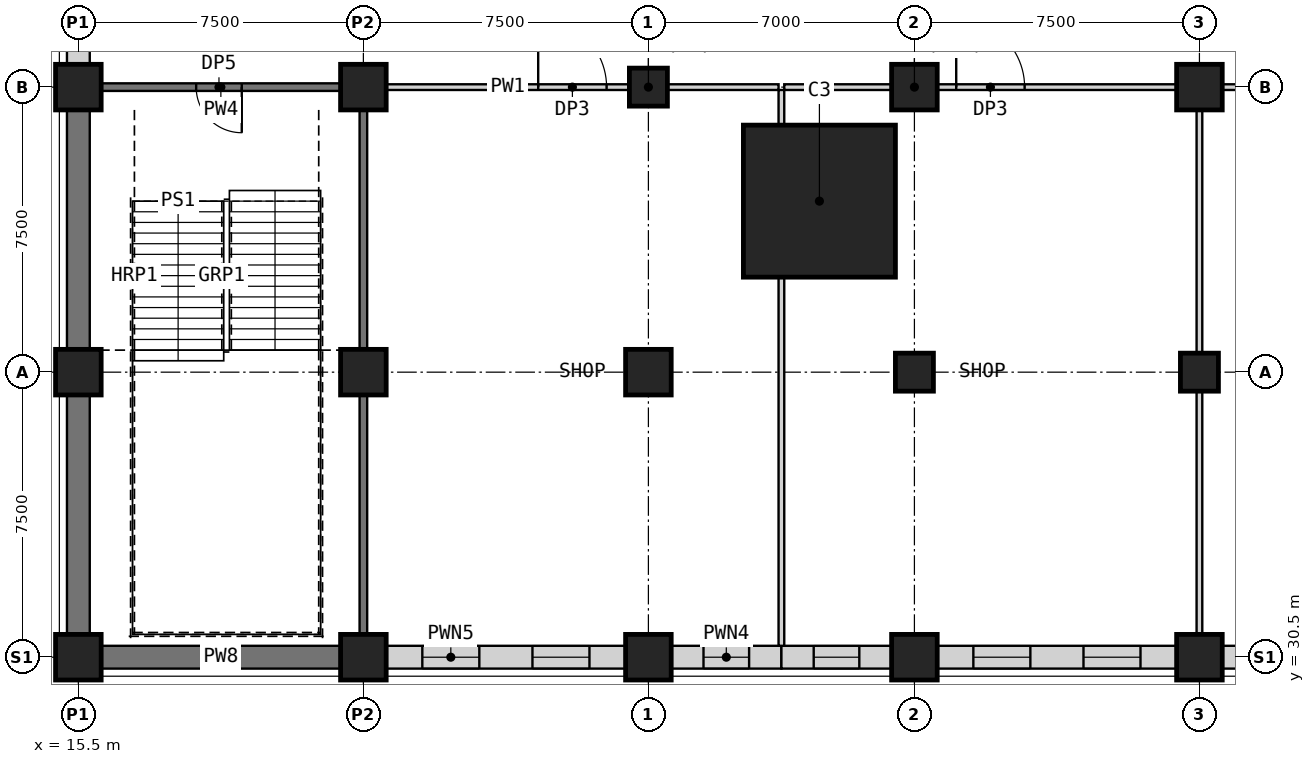
"""IFC4 building model, lengths in metres.
Left out: names, types, materials, properties, quantities, classifications, styles, units other than length and angle.
Written with IfcOpenShell. Run it as: python <this file> out.ifc"""

import sys

from ifc_helpers import new_model, si_unit, direction, frame, frame_2d, origin, origin_2d, place, context, subcontext, project, spatial, rectangle, extrude, element, fill, save


model = new_model("IFC4")
c1 = context("Model", 3, precision=1e-05, world=origin(), true_north=direction((0.0, 1.0)))
c2 = subcontext(c1, "Body", "Model", "MODEL_VIEW")
j1 = project(units=[si_unit("LENGTHUNIT", "METRE"), si_unit("PLANEANGLEUNIT", "RADIAN")], contexts=[c1])
p1 = place(None, origin())
s1 = spatial("IfcSite", under=j1, at=p1, CompositionType="ELEMENT")
p2 = place(p1, origin())
s2 = spatial("IfcBuilding", under=s1, at=p2, CompositionType="ELEMENT")
p3 = place(p2, frame((0.0, 0.0, 13.5)))
s3 = spatial("IfcBuildingStorey", under=s2, at=p3, CompositionType="ELEMENT", Elevation=13.5)
for number, where, z_axis, x_axis in (
    (1, (30.5, 45.5, 0.0), (0.0, 0.0, 1.0), (1.0, 0.0, 0.0)),
    (2, (37.5, 38.0, 0.0), (0.0, 0.0, 1.0), (1.0, 0.0, 0.0)),
):
    element("IfcColumn", number, at=place(p3, frame(where, z_axis=z_axis, x_axis=x_axis)), inside=s3, PredefinedType="COLUMN", context=c2, shape_type="SweptSolid", body=[
        extrude(rectangle(XDim=1.0, YDim=1.0, at=origin_2d()), origin(), (0.0, 0.0, 1.0), 5.0),
    ])
p4 = place(p3, frame((37.5, 45.5, 0.0), z_axis=(0.0, 0.0, 1.0), x_axis=(1.0, 0.0, 0.0)))
e3 = element("IfcColumn", 3, at=p4, inside=s3, PredefinedType="COLUMN", context=c2, shape_type="SweptSolid", body=[
    extrude(rectangle(XDim=1.2, YDim=1.2, at=origin_2d()), origin(), (0.0, 0.0, 1.0), 5.0),
])
p5 = place(p3, frame((45.0, 38.0, 0.0), z_axis=(0.0, 0.0, 1.0), x_axis=(1.0, 0.0, 0.0)))
e4 = element("IfcColumn", 4, at=p5, inside=s3, PredefinedType="COLUMN", context=c2, shape_type="SweptSolid", body=[
    extrude(rectangle(XDim=1.0, YDim=1.0, at=origin_2d()), origin(), (0.0, 0.0, 1.0), 5.0),
])
p6 = place(p3, frame((45.0, 45.5, 0.0), z_axis=(0.0, 0.0, 1.0), x_axis=(1.0, 0.0, 0.0)))
e5 = element("IfcColumn", 5, at=p6, inside=s3, PredefinedType="COLUMN", context=c2, shape_type="SweptSolid", body=[
    extrude(rectangle(XDim=1.2, YDim=1.2, at=origin_2d()), origin(), (0.0, 0.0, 1.0), 5.0),
])
p7 = place(p3, frame((35.0, 42.5, 0.0), z_axis=(0.0, 0.0, 1.0), x_axis=(1.0, 0.0, 0.0)))
e6 = element("IfcColumn", 6, at=p7, inside=s3, PredefinedType="COLUMN", context=c2, shape_type="SweptSolid", body=[
    extrude(rectangle(XDim=4.0, YDim=4.0, at=origin_2d()), origin(), (0.0, 0.0, 1.0), 5.0),
])
for number, where, z_axis, x_axis in (
    (7, (15.5, 30.5, 0.0), (0.0, 0.0, 1.0), (1.0, 0.0, 0.0)),
    (8, (15.5, 38.0, 0.0), (0.0, 0.0, 1.0), (1.0, 0.0, 0.0)),
    (9, (15.5, 45.5, 0.0), (0.0, 0.0, 1.0), (1.0, 0.0, 0.0)),
    (10, (23.0, 30.5, 0.0), (0.0, 0.0, 1.0), (1.0, 0.0, 0.0)),
    (11, (23.0, 38.0, 0.0), (0.0, 0.0, 1.0), (1.0, 0.0, 0.0)),
    (12, (23.0, 45.5, 0.0), (0.0, 0.0, 1.0), (1.0, 0.0, 0.0)),
    (13, (30.5, 30.5, 0.0), (0.0, 0.0, 1.0), (1.0, 0.0, 0.0)),
    (14, (30.5, 38.0, 0.0), (0.0, 0.0, 1.0), (1.0, 0.0, 0.0)),
    (15, (37.5, 30.5, 0.0), (0.0, 0.0, 1.0), (1.0, 0.0, 0.0)),
    (16, (45.0, 30.5, 0.0), (0.0, 0.0, 1.0), (1.0, 0.0, 0.0)),
):
    element("IfcColumn", number, at=place(p3, frame(where, z_axis=z_axis, x_axis=x_axis)), inside=s3, PredefinedType="COLUMN", context=c2, shape_type="SweptSolid", body=[
        extrude(rectangle(XDim=1.2, YDim=1.2, at=origin_2d()), origin(), (0.0, 0.0, 1.0), 5.0),
    ])
p8 = place(p3, frame((16.1, 30.5, 0.0), z_axis=(0.0, 0.0, 1.0), x_axis=(1.0, 0.0, 0.0)))
e17 = element("IfcWall", 17, at=p8, inside=s3, PredefinedType="PARTITIONING", context=c2, shape_type="SweptSolid", body=[
    extrude(rectangle(XDim=6.3, YDim=0.6, at=frame_2d((3.15, 0.0))), origin(), (0.0, 0.0, 1.0), 4.1),
])
p9 = place(p3, frame((23.6, 30.5, 0.0), z_axis=(0.0, 0.0, 1.0), x_axis=(1.0, 0.0, 0.0)))
e18 = element("IfcWall", 18, at=p9, inside=s3, PredefinedType="PARTITIONING", context=c2, shape_type="SweptSolid", body=[
    extrude(rectangle(XDim=6.3, YDim=0.6, at=frame_2d((3.15, 0.0))), origin(), (0.0, 0.0, 1.0), 4.1),
])
p10 = place(p9, frame((0.951, 0.0, 0.9)))
e19 = element("IfcOpeningElement", 19, at=p10, cuts=e18, PredefinedType="OPENING", context=c2, shape_type="SweptSolid", body=[
    extrude(rectangle(XDim=1.5, YDim=2.8, at=frame_2d((0.75, 1.4))), frame((0.0, 0.31, 0.0), z_axis=(0.0, -1.0, 0.0), x_axis=(1.0, 0.0, 0.0)), (0.0, 0.0, 1.0), 0.62),
])
p11 = place(p9, frame((3.849, 0.0, 0.9)))
e20 = element("IfcOpeningElement", 20, at=p11, cuts=e18, PredefinedType="OPENING", context=c2, shape_type="SweptSolid", body=[
    extrude(rectangle(XDim=1.5, YDim=2.8, at=frame_2d((0.75, 1.4))), frame((0.0, 0.31, 0.0), z_axis=(0.0, -1.0, 0.0), x_axis=(1.0, 0.0, 0.0)), (0.0, 0.0, 1.0), 0.62),
])
p12 = place(p3, frame((31.1, 30.5, 0.0), z_axis=(0.0, 0.0, 1.0), x_axis=(1.0, 0.0, 0.0)))
e21 = element("IfcWall", 21, at=p12, inside=s3, PredefinedType="PARTITIONING", context=c2, shape_type="SweptSolid", body=[
    extrude(rectangle(XDim=2.9, YDim=0.6, at=frame_2d((1.45, 0.0))), origin(), (0.0, 0.0, 1.0), 4.1),
])
p13 = place(p12, frame((0.85, 0.0, 0.9)))
e22 = element("IfcOpeningElement", 22, at=p13, cuts=e21, PredefinedType="OPENING", context=c2, shape_type="SweptSolid", body=[
    extrude(rectangle(XDim=1.2, YDim=2.8, at=frame_2d((0.6, 1.4))), frame((0.0, 0.31, 0.0), z_axis=(0.0, -1.0, 0.0), x_axis=(1.0, 0.0, 0.0)), (0.0, 0.0, 1.0), 0.62),
])
p14 = place(p3, frame((34.0, 30.5, 0.0), z_axis=(0.0, 0.0, 1.0), x_axis=(1.0, 0.0, 0.0)))
e23 = element("IfcWall", 23, at=p14, inside=s3, PredefinedType="PARTITIONING", context=c2, shape_type="SweptSolid", body=[
    extrude(rectangle(XDim=2.9, YDim=0.6, at=frame_2d((1.45, 0.0))), origin(), (0.0, 0.0, 1.0), 4.1),
])
p15 = place(p14, frame((0.85, 0.0, 0.9)))
e24 = element("IfcOpeningElement", 24, at=p15, cuts=e23, PredefinedType="OPENING", context=c2, shape_type="SweptSolid", body=[
    extrude(rectangle(XDim=1.2, YDim=2.8, at=frame_2d((0.6, 1.4))), frame((0.0, 0.31, 0.0), z_axis=(0.0, -1.0, 0.0), x_axis=(1.0, 0.0, 0.0)), (0.0, 0.0, 1.0), 0.62),
])
p16 = place(p3, frame((38.1, 30.5, 0.0), z_axis=(0.0, 0.0, 1.0), x_axis=(1.0, 0.0, 0.0)))
e25 = element("IfcWall", 25, at=p16, inside=s3, PredefinedType="PARTITIONING", context=c2, shape_type="SweptSolid", body=[
    extrude(rectangle(XDim=6.3, YDim=0.6, at=frame_2d((3.15, 0.0))), origin(), (0.0, 0.0, 1.0), 4.1),
])
p17 = place(p16, frame((0.951, 0.0, 0.9)))
e26 = element("IfcOpeningElement", 26, at=p17, cuts=e25, PredefinedType="OPENING", context=c2, shape_type="SweptSolid", body=[
    extrude(rectangle(XDim=1.5, YDim=2.8, at=frame_2d((0.75, 1.4))), frame((0.0, 0.31, 0.0), z_axis=(0.0, -1.0, 0.0), x_axis=(1.0, 0.0, 0.0)), (0.0, 0.0, 1.0), 0.62),
])
p18 = place(p16, frame((3.849, 0.0, 0.9)))
e27 = element("IfcOpeningElement", 27, at=p18, cuts=e25, PredefinedType="OPENING", context=c2, shape_type="SweptSolid", body=[
    extrude(rectangle(XDim=1.5, YDim=2.8, at=frame_2d((0.75, 1.4))), frame((0.0, 0.31, 0.0), z_axis=(0.0, -1.0, 0.0), x_axis=(1.0, 0.0, 0.0)), (0.0, 0.0, 1.0), 0.62),
])
p19 = place(p3, frame((45.6, 30.5, 0.0), z_axis=(0.0, 0.0, 1.0), x_axis=(1.0, 0.0, 0.0)))
e28 = element("IfcWall", 28, at=p19, inside=s3, PredefinedType="PARTITIONING", context=c2, shape_type="SweptSolid", body=[
    extrude(rectangle(XDim=6.3, YDim=0.6, at=frame_2d((3.15, 0.0))), origin(), (0.0, 0.0, 1.0), 4.1),
])
p20 = place(p19, frame((0.951, 0.0, 0.9)))
e29 = element("IfcOpeningElement", 29, at=p20, cuts=e28, PredefinedType="OPENING", context=c2, shape_type="SweptSolid", body=[
    extrude(rectangle(XDim=1.5, YDim=2.8, at=frame_2d((0.75, 1.4))), frame((0.0, 0.31, 0.0), z_axis=(0.0, -1.0, 0.0), x_axis=(1.0, 0.0, 0.0)), (0.0, 0.0, 1.0), 0.62),
])
p21 = place(p19, frame((3.849, 0.0, 0.9)))
e30 = element("IfcOpeningElement", 30, at=p21, cuts=e28, PredefinedType="OPENING", context=c2, shape_type="SweptSolid", body=[
    extrude(rectangle(XDim=1.5, YDim=2.8, at=frame_2d((0.75, 1.4))), frame((0.0, 0.31, 0.0), z_axis=(0.0, -1.0, 0.0), x_axis=(1.0, 0.0, 0.0)), (0.0, 0.0, 1.0), 0.62),
])
p22 = place(p3, frame((22.4, 45.5, 0.0), z_axis=(0.0, 0.0, 1.0), x_axis=(-1.0, 0.0, 0.0)))
e31 = element("IfcWall", 31, at=p22, inside=s3, PredefinedType="SHEAR", context=c2, shape_type="SweptSolid", body=[
    extrude(rectangle(XDim=6.3, YDim=0.2, at=frame_2d((3.15, 0.0))), origin(), (0.0, 0.0, 1.0), 4.7),
])
p23 = place(p22, frame((2.6, 0.0, 0.0)))
e32 = element("IfcOpeningElement", 32, at=p23, cuts=e31, PredefinedType="OPENING", context=c2, shape_type="SweptSolid", body=[
    extrude(rectangle(XDim=1.2, YDim=2.1, at=frame_2d((0.6, 1.05))), frame((0.0, 0.11, 0.0), z_axis=(0.0, -1.0, 0.0), x_axis=(1.0, 0.0, 0.0)), (0.0, 0.0, 1.0), 0.22),
])
p24 = place(p3, frame((23.6, 45.5, 0.0), z_axis=(0.0, 0.0, 1.0), x_axis=(1.0, 0.0, 0.0)))
e33 = element("IfcWall", 33, at=p24, inside=s3, PredefinedType="PARTITIONING", context=c2, shape_type="SweptSolid", body=[
    extrude(rectangle(XDim=6.4, YDim=0.15, at=frame_2d((3.2, 0.0))), origin(), (0.0, 0.0, 1.0), 4.7),
])
p25 = place(p24, frame((4.0, 0.0, 0.0)))
e34 = element("IfcOpeningElement", 34, at=p25, cuts=e33, PredefinedType="OPENING", context=c2, shape_type="SweptSolid", body=[
    extrude(rectangle(XDim=1.8, YDim=2.4, at=frame_2d((0.9, 1.2))), frame((0.0, 0.085, 0.0), z_axis=(0.0, -1.0, 0.0), x_axis=(1.0, 0.0, 0.0)), (0.0, 0.0, 1.0), 0.17),
])
p26 = place(p3, frame((31.0, 45.5, 0.0), z_axis=(0.0, 0.0, 1.0), x_axis=(1.0, 0.0, 0.0)))
e35 = element("IfcWall", 35, at=p26, inside=s3, PredefinedType="PARTITIONING", context=c2, shape_type="SweptSolid", body=[
    extrude(rectangle(XDim=2.925, YDim=0.15, at=frame_2d((1.462, 0.0))), origin(), (0.0, 0.0, 1.0), 4.7),
])
p27 = place(p3, frame((34.075, 45.5, 0.0), z_axis=(0.0, 0.0, 1.0), x_axis=(1.0, 0.0, 0.0)))
e36 = element("IfcWall", 36, at=p27, inside=s3, PredefinedType="PARTITIONING", context=c2, shape_type="SweptSolid", body=[
    extrude(rectangle(XDim=2.825, YDim=0.15, at=frame_2d((1.413, 0.0))), origin(), (0.0, 0.0, 1.0), 4.7),
])
p28 = place(p3, frame((38.1, 45.5, 0.0), z_axis=(0.0, 0.0, 1.0), x_axis=(1.0, 0.0, 0.0)))
e37 = element("IfcWall", 37, at=p28, inside=s3, PredefinedType="PARTITIONING", context=c2, shape_type="SweptSolid", body=[
    extrude(rectangle(XDim=6.3, YDim=0.15, at=frame_2d((3.15, 0.0))), origin(), (0.0, 0.0, 1.0), 4.7),
])
p29 = place(p28, frame((0.5, 0.0, 0.0)))
e38 = element("IfcOpeningElement", 38, at=p29, cuts=e37, PredefinedType="OPENING", context=c2, shape_type="SweptSolid", body=[
    extrude(rectangle(XDim=1.8, YDim=2.4, at=frame_2d((0.9, 1.2))), frame((0.0, 0.085, 0.0), z_axis=(0.0, -1.0, 0.0), x_axis=(1.0, 0.0, 0.0)), (0.0, 0.0, 1.0), 0.17),
])
p30 = place(p3, frame((45.6, 45.5, 0.0), z_axis=(0.0, 0.0, 1.0), x_axis=(1.0, 0.0, 0.0)))
e39 = element("IfcWall", 39, at=p30, inside=s3, PredefinedType="PARTITIONING", context=c2, shape_type="SweptSolid", body=[
    extrude(rectangle(XDim=6.3, YDim=0.15, at=frame_2d((3.15, 0.0))), origin(), (0.0, 0.0, 1.0), 4.7),
])
p31 = place(p30, frame((4.0, 0.0, 0.0)))
e40 = element("IfcOpeningElement", 40, at=p31, cuts=e39, PredefinedType="OPENING", context=c2, shape_type="SweptSolid", body=[
    extrude(rectangle(XDim=1.8, YDim=2.4, at=frame_2d((0.9, 1.2))), frame((0.0, 0.085, 0.0), z_axis=(0.0, -1.0, 0.0), x_axis=(1.0, 0.0, 0.0)), (0.0, 0.0, 1.0), 0.17),
])
for number, where, z_axis, x_axis in (
    (41, (15.5, 31.1, 0.0), (0.0, 0.0, 1.0), (0.0, 1.0, 0.0)),
    (42, (15.5, 38.6, 0.0), (0.0, 0.0, 1.0), (0.0, 1.0, 0.0)),
):
    element("IfcWall", number, at=place(p3, frame(where, z_axis=z_axis, x_axis=x_axis)), inside=s3, PredefinedType="PARTITIONING", context=c2, shape_type="SweptSolid", body=[
        extrude(rectangle(XDim=6.3, YDim=0.6, at=frame_2d((3.15, 0.0))), origin(), (0.0, 0.0, 1.0), 4.1),
    ])
p32 = place(p3, frame((15.5, 46.1, 0.0), z_axis=(0.0, 0.0, 1.0), x_axis=(0.0, 1.0, 0.0)))
e43 = element("IfcWall", 43, at=p32, inside=s3, PredefinedType="PARTITIONING", context=c2, shape_type="SweptSolid", body=[
    extrude(rectangle(XDim=5.8, YDim=0.6, at=frame_2d((2.9, 0.0))), origin(), (0.0, 0.0, 1.0), 4.1),
])
p33 = place(p32, frame((0.816, 0.0, 0.9)))
e44 = element("IfcOpeningElement", 44, at=p33, cuts=e43, PredefinedType="OPENING", context=c2, shape_type="SweptSolid", body=[
    extrude(rectangle(XDim=1.5, YDim=2.8, at=frame_2d((0.75, 1.4))), frame((0.0, 0.31, 0.0), z_axis=(0.0, -1.0, 0.0), x_axis=(1.0, 0.0, 0.0)), (0.0, 0.0, 1.0), 0.62),
])
p34 = place(p32, frame((3.484, 0.0, 0.9)))
e45 = element("IfcOpeningElement", 45, at=p34, cuts=e43, PredefinedType="OPENING", context=c2, shape_type="SweptSolid", body=[
    extrude(rectangle(XDim=1.5, YDim=2.8, at=frame_2d((0.75, 1.4))), frame((0.0, 0.31, 0.0), z_axis=(0.0, -1.0, 0.0), x_axis=(1.0, 0.0, 0.0)), (0.0, 0.0, 1.0), 0.62),
])
for number, where, z_axis, x_axis in (
    (46, (23.0, 31.1, 0.0), (0.0, 0.0, 1.0), (0.0, 1.0, 0.0)),
    (47, (23.0, 38.6, 0.0), (0.0, 0.0, 1.0), (0.0, 1.0, 0.0)),
):
    element("IfcWall", number, at=place(p3, frame(where, z_axis=z_axis, x_axis=x_axis)), inside=s3, PredefinedType="SHEAR", context=c2, shape_type="SweptSolid", body=[
        extrude(rectangle(XDim=6.3, YDim=0.2, at=frame_2d((3.15, 0.0))), origin(), (0.0, 0.0, 1.0), 4.7),
    ])
p35 = place(p3, frame((34.0, 30.8, 0.0), z_axis=(0.0, 0.0, 1.0), x_axis=(0.0, 1.0, 0.0)))
e48 = element("IfcWall", 48, at=p35, inside=s3, PredefinedType="PARTITIONING", context=c2, shape_type="SweptSolid", body=[
    extrude(rectangle(XDim=9.7, YDim=0.15, at=frame_2d((4.85, 0.0))), origin(), (0.0, 0.0, 1.0), 4.7),
])
p36 = place(p3, frame((34.0, 44.5, 0.0), z_axis=(0.0, 0.0, 1.0), x_axis=(0.0, 1.0, 0.0)))
e49 = element("IfcWall", 49, at=p36, inside=s3, PredefinedType="PARTITIONING", context=c2, shape_type="SweptSolid", body=[
    extrude(rectangle(XDim=0.925, YDim=0.15, at=frame_2d((0.462, 0.0))), origin(), (0.0, 0.0, 1.0), 4.7),
])
for number, where, z_axis, x_axis in (
    (50, (45.0, 31.1, 0.0), (0.0, 0.0, 1.0), (0.0, 1.0, 0.0)),
    (51, (45.0, 38.5, 0.0), (0.0, 0.0, 1.0), (0.0, 1.0, 0.0)),
):
    element("IfcWall", number, at=place(p3, frame(where, z_axis=z_axis, x_axis=x_axis)), inside=s3, PredefinedType="PARTITIONING", context=c2, shape_type="SweptSolid", body=[
        extrude(rectangle(XDim=6.4, YDim=0.15, at=frame_2d((3.2, 0.0))), origin(), (0.0, 0.0, 1.0), 4.7),
    ])
p37 = place(p10, origin())
e52 = element("IfcWindow", 52, at=p37, inside=s3, PartitioningType="SINGLE_PANEL", PredefinedType="WINDOW", context=c2, shape_type="SweptSolid", body=[
    extrude(rectangle(XDim=1.5, YDim=2.8, at=frame_2d((0.75, 1.4))), frame((0.0, 0.03, 0.0), z_axis=(0.0, -1.0, 0.0), x_axis=(1.0, 0.0, 0.0)), (0.0, 0.0, 1.0), 0.06),
])
fill(e19, e52)
p38 = place(p11, origin())
e53 = element("IfcWindow", 53, at=p38, inside=s3, PartitioningType="SINGLE_PANEL", PredefinedType="WINDOW", context=c2, shape_type="SweptSolid", body=[
    extrude(rectangle(XDim=1.5, YDim=2.8, at=frame_2d((0.75, 1.4))), frame((0.0, 0.03, 0.0), z_axis=(0.0, -1.0, 0.0), x_axis=(1.0, 0.0, 0.0)), (0.0, 0.0, 1.0), 0.06),
])
fill(e20, e53)
p39 = place(p13, origin())
e54 = element("IfcWindow", 54, at=p39, inside=s3, PartitioningType="SINGLE_PANEL", PredefinedType="WINDOW", context=c2, shape_type="SweptSolid", body=[
    extrude(rectangle(XDim=1.2, YDim=2.8, at=frame_2d((0.6, 1.4))), frame((0.0, 0.03, 0.0), z_axis=(0.0, -1.0, 0.0), x_axis=(1.0, 0.0, 0.0)), (0.0, 0.0, 1.0), 0.06),
])
fill(e22, e54)
p40 = place(p15, origin())
e55 = element("IfcWindow", 55, at=p40, inside=s3, PartitioningType="SINGLE_PANEL", PredefinedType="WINDOW", context=c2, shape_type="SweptSolid", body=[
    extrude(rectangle(XDim=1.2, YDim=2.8, at=frame_2d((0.6, 1.4))), frame((0.0, 0.03, 0.0), z_axis=(0.0, -1.0, 0.0), x_axis=(1.0, 0.0, 0.0)), (0.0, 0.0, 1.0), 0.06),
])
fill(e24, e55)
p41 = place(p17, origin())
e56 = element("IfcWindow", 56, at=p41, inside=s3, PartitioningType="SINGLE_PANEL", PredefinedType="WINDOW", context=c2, shape_type="SweptSolid", body=[
    extrude(rectangle(XDim=1.5, YDim=2.8, at=frame_2d((0.75, 1.4))), frame((0.0, 0.03, 0.0), z_axis=(0.0, -1.0, 0.0), x_axis=(1.0, 0.0, 0.0)), (0.0, 0.0, 1.0), 0.06),
])
fill(e26, e56)
p42 = place(p18, origin())
e57 = element("IfcWindow", 57, at=p42, inside=s3, PartitioningType="SINGLE_PANEL", PredefinedType="WINDOW", context=c2, shape_type="SweptSolid", body=[
    extrude(rectangle(XDim=1.5, YDim=2.8, at=frame_2d((0.75, 1.4))), frame((0.0, 0.03, 0.0), z_axis=(0.0, -1.0, 0.0), x_axis=(1.0, 0.0, 0.0)), (0.0, 0.0, 1.0), 0.06),
])
fill(e27, e57)
p43 = place(p23, origin())
e58 = element("IfcDoor", 58, at=p43, inside=s3, OperationType="SINGLE_SWING_LEFT", PredefinedType="DOOR", context=c2, shape_type="SweptSolid", body=[
    extrude(rectangle(XDim=1.2, YDim=2.1, at=frame_2d((0.6, 1.05))), frame((0.0, 0.025, 0.0), z_axis=(0.0, -1.0, 0.0), x_axis=(1.0, 0.0, 0.0)), (0.0, 0.0, 1.0), 0.05),
])
fill(e32, e58)
p44 = place(p25, origin())
e59 = element("IfcDoor", 59, at=p44, inside=s3, OperationType="SINGLE_SWING_LEFT", PredefinedType="DOOR", context=c2, shape_type="SweptSolid", body=[
    extrude(rectangle(XDim=1.8, YDim=2.4, at=frame_2d((0.9, 1.2))), frame((0.0, 0.025, 0.0), z_axis=(0.0, -1.0, 0.0), x_axis=(1.0, 0.0, 0.0)), (0.0, 0.0, 1.0), 0.05),
])
fill(e34, e59)
p45 = place(p29, origin())
e60 = element("IfcDoor", 60, at=p45, inside=s3, OperationType="SINGLE_SWING_LEFT", PredefinedType="DOOR", context=c2, shape_type="SweptSolid", body=[
    extrude(rectangle(XDim=1.8, YDim=2.4, at=frame_2d((0.9, 1.2))), frame((0.0, 0.025, 0.0), z_axis=(0.0, -1.0, 0.0), x_axis=(1.0, 0.0, 0.0)), (0.0, 0.0, 1.0), 0.05),
])
fill(e38, e60)
save(model, sys.argv[1])
